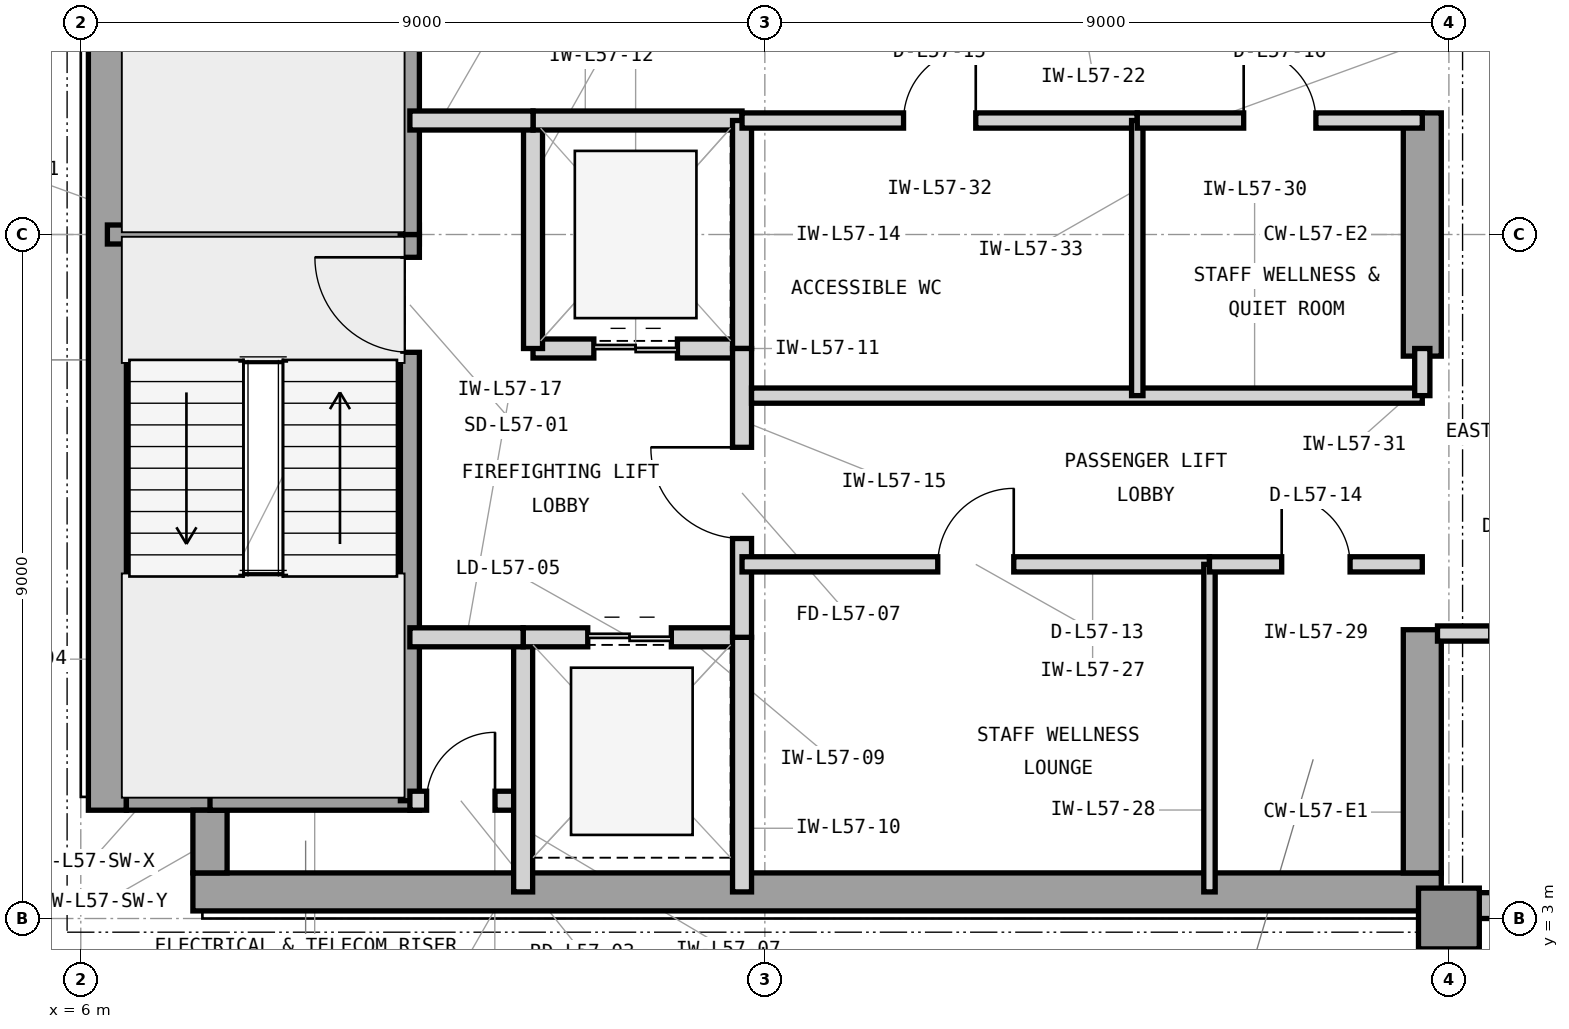
"""IFC4 building model, lengths in metres.
Left out: names, types, materials, properties, quantities, classifications, styles, units other than length and angle.
Written with IfcOpenShell. Run it as: python <this file> out.ifc"""

import sys

from ifc_helpers import new_model, si_unit, direction, frame, frame_2d, origin, origin_2d, place, context, subcontext, project, spatial, rectangle, extrude, element, fill, save


model = new_model("IFC4")
c1 = context("Model", 3, precision=1e-05, world=origin(), true_north=direction((0.0, 1.0)))
c2 = subcontext(c1, "Body", "Model", "MODEL_VIEW")
j1 = project(units=[si_unit("LENGTHUNIT", "METRE"), si_unit("PLANEANGLEUNIT", "RADIAN")], contexts=[c1])
p1 = place(None, origin())
s1 = spatial("IfcSite", under=j1, at=p1, CompositionType="ELEMENT")
p2 = place(p1, origin())
s2 = spatial("IfcBuilding", under=s1, at=p2, CompositionType="ELEMENT")
p3 = place(p2, frame((0.0, 0.0, 235.2)))
s3 = spatial("IfcBuildingStorey", under=s2, at=p3, CompositionType="ELEMENT", Elevation=235.2)
p4 = place(p3, frame((7.475, 3.35, 0.0), z_axis=(0.0, 0.0, 1.0), x_axis=(1.0, 0.0, 0.0)))
e1 = element("IfcWall", 1, at=p4, inside=s3, PredefinedType="SHEAR", context=c2, shape_type="SweptSolid", body=[
    extrude(rectangle(XDim=16.425, YDim=0.5, at=frame_2d((8.212, 0.0))), origin(), (0.0, 0.0, 1.0), 3.9),
])
p5 = place(p3, frame((6.35, 4.425, 0.0), z_axis=(0.0, 0.0, 1.0), x_axis=(0.0, 1.0, 0.0)))
e2 = element("IfcWall", 2, at=p5, inside=s3, PredefinedType="SHEAR", context=c2, shape_type="SweptSolid", body=[
    extrude(rectangle(XDim=15.15, YDim=0.5, at=frame_2d((7.575, 0.0))), origin(), (0.0, 0.0, 1.0), 3.9),
])
p6 = place(p3, frame((23.65, 3.6, 0.0), z_axis=(0.0, 0.0, 1.0), x_axis=(0.0, 1.0, 0.0)))
e3 = element("IfcWall", 3, at=p6, inside=s3, PredefinedType="SHEAR", context=c2, shape_type="SweptSolid", body=[
    extrude(rectangle(XDim=3.2, YDim=0.5, at=frame_2d((1.6, 0.0))), origin(), (0.0, 0.0, 1.0), 3.9),
])
p7 = place(p3, frame((23.65, 10.4, 0.0), z_axis=(0.0, 0.0, 1.0), x_axis=(0.0, 1.0, 0.0)))
e4 = element("IfcWall", 4, at=p7, inside=s3, PredefinedType="SHEAR", context=c2, shape_type="SweptSolid", body=[
    extrude(rectangle(XDim=3.2, YDim=0.5, at=frame_2d((1.6, 0.0))), origin(), (0.0, 0.0, 1.0), 3.9),
])
p8 = place(p3, frame((6.6, 4.65, 0.0), z_axis=(0.0, 0.0, 1.0), x_axis=(1.0, 0.0, 0.0)))
e5 = element("IfcWall", 5, at=p8, inside=s3, PredefinedType="SHEAR", context=c2, shape_type="SweptSolid", body=[
    extrude(rectangle(XDim=1.325, YDim=0.45, at=frame_2d((0.663, 0.0))), origin(), (0.0, 0.0, 1.0), 3.9),
])
p9 = place(p3, frame((7.7, 3.6, 0.0), z_axis=(0.0, 0.0, 1.0), x_axis=(0.0, 1.0, 0.0)))
e6 = element("IfcWall", 6, at=p9, inside=s3, PredefinedType="SHEAR", context=c2, shape_type="SweptSolid", body=[
    extrude(rectangle(XDim=0.825, YDim=0.45, at=frame_2d((0.413, 0.0))), origin(), (0.0, 0.0, 1.0), 3.9),
])
p10 = place(p3, frame((24.0, 3.0, 0.0), z_axis=(0.0, 0.0, 1.0), x_axis=(1.0, 0.0, 0.0)))
e7 = element("IfcColumn", 7, at=p10, inside=s3, PredefinedType="COLUMN", context=c2, shape_type="SweptSolid", body=[
    extrude(rectangle(XDim=0.8, YDim=0.8, at=origin_2d()), origin(), (0.0, 0.0, 1.0), 3.9),
])
p11 = place(p3, frame((23.9, 3.17, 0.0), z_axis=(0.0, 0.0, 1.0), x_axis=(1.0, 0.0, 0.0)))
e8 = element("IfcWall", 8, at=p11, inside=s3, PredefinedType="STANDARD", context=c2, shape_type="SweptSolid", body=[
    extrude(rectangle(XDim=28.5, YDim=0.34, at=frame_2d((14.25, 0.0))), origin(), (0.0, 0.0, 1.0), 3.7),
])
p12 = place(p11, frame((10.725, 0.0, 0.9)))
e9 = element("IfcOpeningElement", 9, at=p12, cuts=e8, PredefinedType="OPENING", context=c2, shape_type="SweptSolid", body=[
    extrude(rectangle(XDim=2.3, YDim=2.2, at=frame_2d((1.15, 1.1))), frame((0.0, 0.18, 0.0), z_axis=(0.0, -1.0, 0.0), x_axis=(1.0, 0.0, 0.0)), (0.0, 0.0, 1.0), 0.36),
])
p13 = place(p11, frame((20.225, 0.0, 0.9)))
e10 = element("IfcOpeningElement", 10, at=p13, cuts=e8, PredefinedType="OPENING", context=c2, shape_type="SweptSolid", body=[
    extrude(rectangle(XDim=2.3, YDim=2.2, at=frame_2d((1.15, 1.1))), frame((0.0, 0.18, 0.0), z_axis=(0.0, -1.0, 0.0), x_axis=(1.0, 0.0, 0.0)), (0.0, 0.0, 1.0), 0.36),
])
p14 = place(p11, frame((0.85, 0.0, 0.9)))
e11 = element("IfcOpeningElement", 11, at=p14, cuts=e8, PredefinedType="OPENING", context=c2, shape_type="SweptSolid", body=[
    extrude(rectangle(XDim=1.6, YDim=2.2, at=frame_2d((0.8, 1.1))), frame((0.0, 0.18, 0.0), z_axis=(0.0, -1.0, 0.0), x_axis=(1.0, 0.0, 0.0)), (0.0, 0.0, 1.0), 0.36),
])
p15 = place(p3, frame((6.35, 12.0, 0.0), z_axis=(0.0, 0.0, 1.0), x_axis=(1.0, 0.0, 0.0)))
e12 = element("IfcWall", 12, at=p15, inside=s3, PredefinedType="SHEAR", context=c2, shape_type="SweptSolid", body=[
    extrude(rectangle(XDim=4.105, YDim=0.25, at=frame_2d((2.052, 0.0))), origin(), (0.0, 0.0, 1.0), 3.9),
])
p16 = place(p3, frame((7.7, 4.55, 0.0), z_axis=(0.0, 0.0, 1.0), x_axis=(1.0, 0.0, 0.0)))
e13 = element("IfcWall", 13, at=p16, inside=s3, PredefinedType="SHEAR", context=c2, shape_type="SweptSolid", body=[
    extrude(rectangle(XDim=2.755, YDim=0.25, at=frame_2d((1.377, 0.0))), origin(), (0.0, 0.0, 1.0), 3.9),
])
p17 = place(p3, frame((10.33, 4.55, 0.0), z_axis=(0.0, 0.0, 1.0), x_axis=(0.0, 1.0, 0.0)))
e14 = element("IfcWall", 14, at=p17, inside=s3, PredefinedType="SHEAR", context=c2, shape_type="SweptSolid", body=[
    extrude(rectangle(XDim=7.45, YDim=0.25, at=frame_2d((3.725, 0.0))), origin(), (0.0, 0.0, 1.0), 3.9),
])
p18 = place(p17, frame((5.9, 0.0, 0.0)))
e15 = element("IfcOpeningElement", 15, at=p18, cuts=e14, PredefinedType="OPENING", context=c2, shape_type="SweptSolid", body=[
    extrude(rectangle(XDim=1.25, YDim=2.2, at=frame_2d((0.625, 1.1))), frame((0.0, 0.135, 0.0), z_axis=(0.0, -1.0, 0.0), x_axis=(1.0, 0.0, 0.0)), (0.0, 0.0, 1.0), 0.27),
])
p19 = place(p3, frame((10.33, 12.0, 0.0), z_axis=(0.0, 0.0, 1.0), x_axis=(0.0, 1.0, 0.0)))
e16 = element("IfcWall", 16, at=p19, inside=s3, PredefinedType="SHEAR", context=c2, shape_type="SweptSolid", body=[
    extrude(rectangle(XDim=7.45, YDim=0.25, at=frame_2d((3.725, 0.0))), origin(), (0.0, 0.0, 1.0), 3.9),
])
p20 = place(p19, frame((5.85, 0.0, 0.0)))
e17 = element("IfcOpeningElement", 17, at=p20, cuts=e16, PredefinedType="OPENING", context=c2, shape_type="SweptSolid", body=[
    extrude(rectangle(XDim=1.25, YDim=2.2, at=frame_2d((0.625, 1.1))), frame((0.0, 0.135, 0.0), z_axis=(0.0, -1.0, 0.0), x_axis=(1.0, 0.0, 0.0)), (0.0, 0.0, 1.0), 0.27),
])
p21 = place(p3, frame((10.33, 4.55, 0.0), z_axis=(0.0, 0.0, 1.0), x_axis=(1.0, 0.0, 0.0)))
e18 = element("IfcWall", 18, at=p21, inside=s3, PredefinedType="PARTITIONING", context=c2, shape_type="SweptSolid", body=[
    extrude(rectangle(XDim=1.49, YDim=0.25, at=frame_2d((0.745, 0.0))), origin(), (0.0, 0.0, 1.0), 3.69),
])
p22 = place(p21, frame((0.22, 0.0, 0.0)))
e19 = element("IfcOpeningElement", 19, at=p22, cuts=e18, PredefinedType="OPENING", context=c2, shape_type="SweptSolid", body=[
    extrude(rectangle(XDim=0.9, YDim=2.1, at=frame_2d((0.45, 1.05))), frame((0.0, 0.135, 0.0), z_axis=(0.0, -1.0, 0.0), x_axis=(1.0, 0.0, 0.0)), (0.0, 0.0, 1.0), 0.27),
])
p23 = place(p3, frame((11.82, 3.35, 0.0), z_axis=(0.0, 0.0, 1.0), x_axis=(0.0, 1.0, 0.0)))
e20 = element("IfcWall", 20, at=p23, inside=s3, PredefinedType="PARTITIONING", context=c2, shape_type="SweptSolid", body=[
    extrude(rectangle(XDim=3.35, YDim=0.25, at=frame_2d((1.675, 0.0))), origin(), (0.0, 0.0, 1.0), 3.69),
])
p24 = place(p3, frame((11.82, 6.7, 0.0), z_axis=(0.0, 0.0, 1.0), x_axis=(1.0, 0.0, 0.0)))
e21 = element("IfcWall", 21, at=p24, inside=s3, PredefinedType="PARTITIONING", context=c2, shape_type="SweptSolid", body=[
    extrude(rectangle(XDim=2.88, YDim=0.25, at=frame_2d((1.44, 0.0))), origin(), (0.0, 0.0, 1.0), 3.073),
])
p25 = place(p24, frame((0.85, 0.0, 0.0)))
e22 = element("IfcOpeningElement", 22, at=p25, cuts=e21, PredefinedType="OPENING", context=c2, shape_type="SweptSolid", body=[
    extrude(rectangle(XDim=1.1, YDim=2.25, at=frame_2d((0.55, 1.125))), frame((0.0, 0.135, 0.0), z_axis=(0.0, -1.0, 0.0), x_axis=(1.0, 0.0, 0.0)), (0.0, 0.0, 1.0), 0.27),
])
p26 = place(p3, frame((14.7, 3.35, 0.0), z_axis=(0.0, 0.0, 1.0), x_axis=(0.0, 1.0, 0.0)))
e23 = element("IfcWall", 23, at=p26, inside=s3, PredefinedType="PARTITIONING", context=c2, shape_type="SweptSolid", body=[
    extrude(rectangle(XDim=3.35, YDim=0.25, at=frame_2d((1.675, 0.0))), origin(), (0.0, 0.0, 1.0), 3.69),
])
p27 = place(p3, frame((11.95, 10.5, 0.0), z_axis=(0.0, 0.0, 1.0), x_axis=(1.0, 0.0, 0.0)))
e24 = element("IfcWall", 24, at=p27, inside=s3, PredefinedType="PARTITIONING", context=c2, shape_type="SweptSolid", body=[
    extrude(rectangle(XDim=2.75, YDim=0.25, at=frame_2d((1.375, 0.0))), origin(), (0.0, 0.0, 1.0), 3.073),
])
p28 = place(p27, frame((0.8, 0.0, 0.0)))
e25 = element("IfcOpeningElement", 25, at=p28, cuts=e24, PredefinedType="OPENING", context=c2, shape_type="SweptSolid", body=[
    extrude(rectangle(XDim=1.1, YDim=2.25, at=frame_2d((0.55, 1.125))), frame((0.0, 0.135, 0.0), z_axis=(0.0, -1.0, 0.0), x_axis=(1.0, 0.0, 0.0)), (0.0, 0.0, 1.0), 0.27),
])
p29 = place(p3, frame((11.95, 10.5, 0.0), z_axis=(0.0, 0.0, 1.0), x_axis=(0.0, 1.0, 0.0)))
e26 = element("IfcWall", 26, at=p29, inside=s3, PredefinedType="PARTITIONING", context=c2, shape_type="SweptSolid", body=[
    extrude(rectangle(XDim=3.0, YDim=0.25, at=frame_2d((1.5, 0.0))), origin(), (0.0, 0.0, 1.0), 3.69),
])
p30 = place(p3, frame((11.95, 13.5, 0.0), z_axis=(0.0, 0.0, 1.0), x_axis=(1.0, 0.0, 0.0)))
e27 = element("IfcWall", 27, at=p30, inside=s3, PredefinedType="PARTITIONING", context=c2, shape_type="SweptSolid", body=[
    extrude(rectangle(XDim=2.75, YDim=0.25, at=frame_2d((1.375, 0.0))), origin(), (0.0, 0.0, 1.0), 3.073),
])
p31 = place(p3, frame((14.7, 10.5, 0.0), z_axis=(0.0, 0.0, 1.0), x_axis=(0.0, 1.0, 0.0)))
e28 = element("IfcWall", 28, at=p31, inside=s3, PredefinedType="PARTITIONING", context=c2, shape_type="SweptSolid", body=[
    extrude(rectangle(XDim=3.0, YDim=0.25, at=frame_2d((1.5, 0.0))), origin(), (0.0, 0.0, 1.0), 3.69),
])
p32 = place(p3, frame((14.7, 6.7, 0.0), z_axis=(0.0, 0.0, 1.0), x_axis=(0.0, 1.0, 0.0)))
e29 = element("IfcWall", 29, at=p32, inside=s3, PredefinedType="PARTITIONING", context=c2, shape_type="SweptSolid", body=[
    extrude(rectangle(XDim=3.8, YDim=0.25, at=frame_2d((1.9, 0.0))), origin(), (0.0, 0.0, 1.0), 3.69),
])
p33 = place(p32, frame((1.3, 0.0, 0.0)))
e30 = element("IfcOpeningElement", 30, at=p33, cuts=e29, PredefinedType="OPENING", context=c2, shape_type="SweptSolid", body=[
    extrude(rectangle(XDim=1.2, YDim=2.2, at=frame_2d((0.6, 1.1))), frame((0.0, 0.135, 0.0), z_axis=(0.0, -1.0, 0.0), x_axis=(1.0, 0.0, 0.0)), (0.0, 0.0, 1.0), 0.27),
])
p34 = place(p3, frame((10.33, 13.5, 0.0), z_axis=(0.0, 0.0, 1.0), x_axis=(1.0, 0.0, 0.0)))
e31 = element("IfcWall", 31, at=p34, inside=s3, PredefinedType="PARTITIONING", context=c2, shape_type="SweptSolid", body=[
    extrude(rectangle(XDim=1.62, YDim=0.25, at=frame_2d((0.81, 0.0))), origin(), (0.0, 0.0, 1.0), 3.073),
])
p35 = place(p3, frame((10.33, 6.7, 0.0), z_axis=(0.0, 0.0, 1.0), x_axis=(1.0, 0.0, 0.0)))
e32 = element("IfcWall", 32, at=p35, inside=s3, PredefinedType="PARTITIONING", context=c2, shape_type="SweptSolid", body=[
    extrude(rectangle(XDim=1.49, YDim=0.25, at=frame_2d((0.745, 0.0))), origin(), (0.0, 0.0, 1.0), 3.073),
])
p36 = place(p3, frame((14.7, 7.66, 0.0), z_axis=(0.0, 0.0, 1.0), x_axis=(1.0, 0.0, 0.0)))
e33 = element("IfcWall", 33, at=p36, inside=s3, PredefinedType="PARTITIONING", context=c2, shape_type="SweptSolid", body=[
    extrude(rectangle(XDim=6.15, YDim=0.2, at=frame_2d((3.075, 0.0))), origin(), (0.0, 0.0, 1.0), 3.69),
])
p37 = place(p36, frame((2.575, 0.0, 0.0)))
e34 = element("IfcOpeningElement", 34, at=p37, cuts=e33, PredefinedType="OPENING", context=c2, shape_type="SweptSolid", body=[
    extrude(rectangle(XDim=1.0, YDim=2.15, at=frame_2d((0.5, 1.075))), frame((0.0, 0.11, 0.0), z_axis=(0.0, -1.0, 0.0), x_axis=(1.0, 0.0, 0.0)), (0.0, 0.0, 1.0), 0.22),
])
p38 = place(p3, frame((20.85, 3.35, 0.0), z_axis=(0.0, 0.0, 1.0), x_axis=(0.0, 1.0, 0.0)))
e35 = element("IfcWall", 35, at=p38, inside=s3, PredefinedType="PARTITIONING", context=c2, shape_type="SweptSolid", body=[
    extrude(rectangle(XDim=4.31, YDim=0.15, at=frame_2d((2.155, 0.0))), origin(), (0.0, 0.0, 1.0), 3.69),
])
p39 = place(p3, frame((20.85, 7.66, 0.0), z_axis=(0.0, 0.0, 1.0), x_axis=(1.0, 0.0, 0.0)))
e36 = element("IfcWall", 36, at=p39, inside=s3, PredefinedType="PARTITIONING", context=c2, shape_type="SweptSolid", body=[
    extrude(rectangle(XDim=2.8, YDim=0.2, at=frame_2d((1.4, 0.0))), origin(), (0.0, 0.0, 1.0), 3.69),
])
p40 = place(p39, frame((0.95, 0.0, 0.0)))
e37 = element("IfcOpeningElement", 37, at=p40, cuts=e36, PredefinedType="OPENING", context=c2, shape_type="SweptSolid", body=[
    extrude(rectangle(XDim=0.9, YDim=2.1, at=frame_2d((0.45, 1.05))), frame((0.0, 0.11, 0.0), z_axis=(0.0, -1.0, 0.0), x_axis=(1.0, 0.0, 0.0)), (0.0, 0.0, 1.0), 0.22),
])
p41 = place(p3, frame((14.825, 9.88, 0.0), z_axis=(0.0, 0.0, 1.0), x_axis=(1.0, 0.0, 0.0)))
e38 = element("IfcWall", 38, at=p41, inside=s3, PredefinedType="PARTITIONING", context=c2, shape_type="SweptSolid", body=[
    extrude(rectangle(XDim=8.825, YDim=0.2, at=frame_2d((4.413, 0.0))), origin(), (0.0, 0.0, 1.0), 3.69),
])
p42 = place(p3, frame((23.65, 9.88, 0.0), z_axis=(0.0, 0.0, 1.0), x_axis=(0.0, 1.0, 0.0)))
e39 = element("IfcWall", 39, at=p42, inside=s3, PredefinedType="PARTITIONING", context=c2, shape_type="SweptSolid", body=[
    extrude(rectangle(XDim=0.62, YDim=0.2, at=frame_2d((0.31, 0.0))), origin(), (0.0, 0.0, 1.0), 3.69),
])
p43 = place(p3, frame((14.7, 13.5, 0.0), z_axis=(0.0, 0.0, 1.0), x_axis=(1.0, 0.0, 0.0)))
e40 = element("IfcWall", 40, at=p43, inside=s3, PredefinedType="PARTITIONING", context=c2, shape_type="SweptSolid", body=[
    extrude(rectangle(XDim=5.2, YDim=0.2, at=frame_2d((2.6, 0.0))), origin(), (0.0, 0.0, 1.0), 3.073),
])
p44 = place(p43, frame((2.125, 0.0, 0.0)))
e41 = element("IfcOpeningElement", 41, at=p44, cuts=e40, PredefinedType="OPENING", context=c2, shape_type="SweptSolid", body=[
    extrude(rectangle(XDim=0.95, YDim=2.1, at=frame_2d((0.475, 1.05))), frame((0.0, 0.11, 0.0), z_axis=(0.0, -1.0, 0.0), x_axis=(1.0, 0.0, 0.0)), (0.0, 0.0, 1.0), 0.22),
])
p45 = place(p3, frame((19.9, 9.88, 0.0), z_axis=(0.0, 0.0, 1.0), x_axis=(0.0, 1.0, 0.0)))
e42 = element("IfcWall", 42, at=p45, inside=s3, PredefinedType="PARTITIONING", context=c2, shape_type="SweptSolid", body=[
    extrude(rectangle(XDim=3.62, YDim=0.15, at=frame_2d((1.81, 0.0))), origin(), (0.0, 0.0, 1.0), 3.69),
])
p46 = place(p3, frame((19.9, 13.5, 0.0), z_axis=(0.0, 0.0, 1.0), x_axis=(1.0, 0.0, 0.0)))
e43 = element("IfcWall", 43, at=p46, inside=s3, PredefinedType="PARTITIONING", context=c2, shape_type="SweptSolid", body=[
    extrude(rectangle(XDim=3.75, YDim=0.2, at=frame_2d((1.875, 0.0))), origin(), (0.0, 0.0, 1.0), 3.073),
])
p47 = place(p46, frame((1.4, 0.0, 0.0)))
e44 = element("IfcOpeningElement", 44, at=p47, cuts=e43, PredefinedType="OPENING", context=c2, shape_type="SweptSolid", body=[
    extrude(rectangle(XDim=0.95, YDim=2.1, at=frame_2d((0.475, 1.05))), frame((0.0, 0.11, 0.0), z_axis=(0.0, -1.0, 0.0), x_axis=(1.0, 0.0, 0.0)), (0.0, 0.0, 1.0), 0.22),
])
p48 = place(p3, frame((23.85, 6.75, 0.0), z_axis=(0.0, 0.0, 1.0), x_axis=(1.0, 0.0, 0.0)))
e45 = element("IfcWall", 45, at=p48, inside=s3, PredefinedType="PARTITIONING", context=c2, shape_type="SweptSolid", body=[
    extrude(rectangle(XDim=2.85, YDim=0.2, at=frame_2d((1.425, 0.0))), origin(), (0.0, 0.0, 1.0), 3.69),
])
p49 = place(p48, frame((0.7, 0.0, 0.0)))
e46 = element("IfcOpeningElement", 46, at=p49, cuts=e45, PredefinedType="OPENING", context=c2, shape_type="SweptSolid", body=[
    extrude(rectangle(XDim=1.0, YDim=2.15, at=frame_2d((0.5, 1.075))), frame((0.0, 0.11, 0.0), z_axis=(0.0, -1.0, 0.0), x_axis=(1.0, 0.0, 0.0)), (0.0, 0.0, 1.0), 0.22),
])
p50 = place(p18, origin())
e47 = element("IfcDoor", 47, at=p50, inside=s3, OperationType="SINGLE_SWING_RIGHT", PredefinedType="DOOR", context=c2, shape_type="SweptSolid", body=[
    extrude(rectangle(XDim=1.25, YDim=2.2, at=frame_2d((0.625, 1.1))), frame((0.0, 0.025, 0.0), z_axis=(0.0, -1.0, 0.0), x_axis=(1.0, 0.0, 0.0)), (0.0, 0.0, 1.0), 0.05),
])
fill(e15, e47)
p51 = place(p22, origin())
e48 = element("IfcDoor", 48, at=p51, inside=s3, OperationType="SINGLE_SWING_RIGHT", PredefinedType="TRAPDOOR", context=c2, shape_type="SweptSolid", body=[
    extrude(rectangle(XDim=0.9, YDim=2.1, at=frame_2d((0.45, 1.05))), frame((0.0, 0.025, 0.0), z_axis=(0.0, -1.0, 0.0), x_axis=(1.0, 0.0, 0.0)), (0.0, 0.0, 1.0), 0.05),
])
fill(e19, e48)
p52 = place(p25, origin())
e49 = element("IfcDoor", 49, at=p52, inside=s3, OperationType="DOUBLE_DOOR_SLIDING", PredefinedType="DOOR", context=c2, shape_type="SweptSolid", body=[
    extrude(rectangle(XDim=1.1, YDim=2.25, at=frame_2d((0.55, 1.125))), frame((0.0, 0.025, 0.0), z_axis=(0.0, -1.0, 0.0), x_axis=(1.0, 0.0, 0.0)), (0.0, 0.0, 1.0), 0.05),
])
fill(e22, e49)
p53 = place(p28, origin())
e50 = element("IfcDoor", 50, at=p53, inside=s3, OperationType="DOUBLE_DOOR_SLIDING", PredefinedType="DOOR", context=c2, shape_type="SweptSolid", body=[
    extrude(rectangle(XDim=1.1, YDim=2.25, at=frame_2d((0.55, 1.125))), frame((0.0, 0.025, 0.0), z_axis=(0.0, -1.0, 0.0), x_axis=(1.0, 0.0, 0.0)), (0.0, 0.0, 1.0), 0.05),
])
fill(e25, e50)
p54 = place(p33, origin())
e51 = element("IfcDoor", 51, at=p54, inside=s3, OperationType="SINGLE_SWING_RIGHT", PredefinedType="DOOR", context=c2, shape_type="SweptSolid", body=[
    extrude(rectangle(XDim=1.2, YDim=2.2, at=frame_2d((0.6, 1.1))), frame((0.0, 0.025, 0.0), z_axis=(0.0, -1.0, 0.0), x_axis=(1.0, 0.0, 0.0)), (0.0, 0.0, 1.0), 0.05),
])
fill(e30, e51)
p55 = place(p37, origin())
e52 = element("IfcDoor", 52, at=p55, inside=s3, OperationType="SINGLE_SWING_RIGHT", PredefinedType="DOOR", context=c2, shape_type="SweptSolid", body=[
    extrude(rectangle(XDim=1.0, YDim=2.15, at=frame_2d((0.5, 1.075))), frame((0.0, 0.025, 0.0), z_axis=(0.0, -1.0, 0.0), x_axis=(1.0, 0.0, 0.0)), (0.0, 0.0, 1.0), 0.05),
])
fill(e34, e52)
p56 = place(p40, origin())
e53 = element("IfcDoor", 53, at=p56, inside=s3, OperationType="SINGLE_SWING_LEFT", PredefinedType="TRAPDOOR", context=c2, shape_type="SweptSolid", body=[
    extrude(rectangle(XDim=0.9, YDim=2.1, at=frame_2d((0.45, 1.05))), frame((0.0, 0.025, 0.0), z_axis=(0.0, -1.0, 0.0), x_axis=(1.0, 0.0, 0.0)), (0.0, 0.0, 1.0), 0.05),
])
fill(e37, e53)
p57 = place(p44, origin())
e54 = element("IfcDoor", 54, at=p57, inside=s3, OperationType="SINGLE_SWING_RIGHT", PredefinedType="DOOR", context=c2, shape_type="SweptSolid", body=[
    extrude(rectangle(XDim=0.95, YDim=2.1, at=frame_2d((0.475, 1.05))), frame((0.0, 0.025, 0.0), z_axis=(0.0, -1.0, 0.0), x_axis=(1.0, 0.0, 0.0)), (0.0, 0.0, 1.0), 0.05),
])
fill(e41, e54)
p58 = place(p47, origin())
e55 = element("IfcDoor", 55, at=p58, inside=s3, OperationType="SINGLE_SWING_LEFT", PredefinedType="DOOR", context=c2, shape_type="SweptSolid", body=[
    extrude(rectangle(XDim=0.95, YDim=2.1, at=frame_2d((0.475, 1.05))), frame((0.0, 0.025, 0.0), z_axis=(0.0, -1.0, 0.0), x_axis=(1.0, 0.0, 0.0)), (0.0, 0.0, 1.0), 0.05),
])
fill(e44, e55)
save(model, sys.argv[1])
